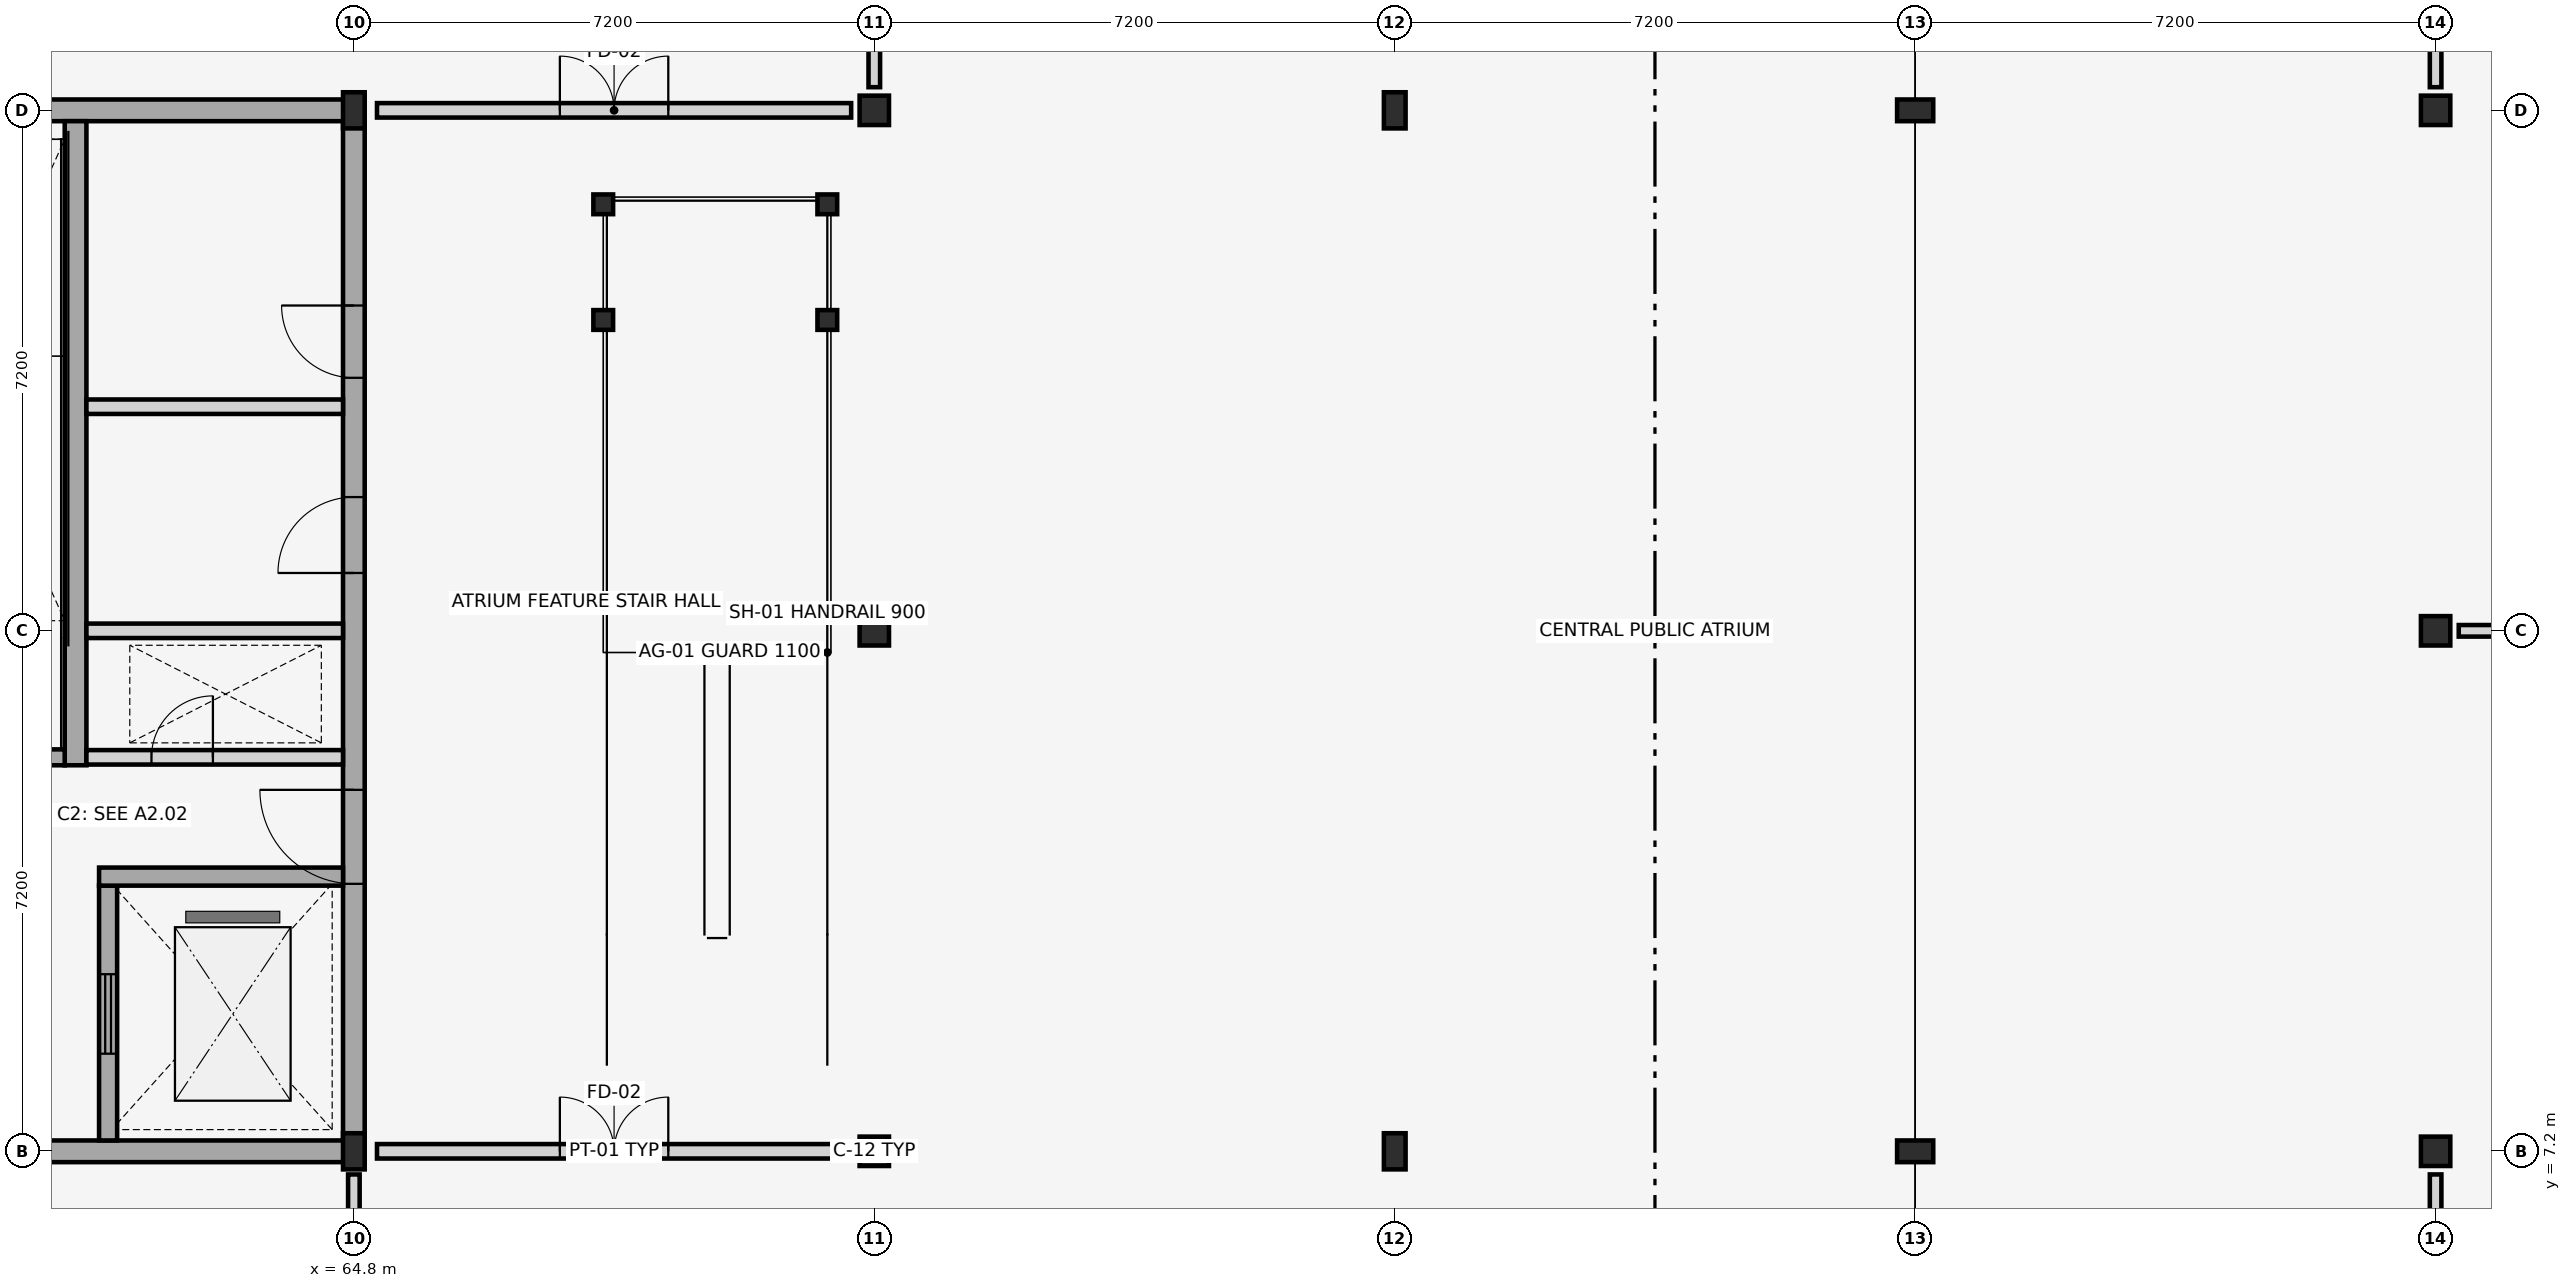
"""IFC4 building model, lengths in metres.
Left out: names, types, materials, properties, quantities, classifications, styles, units other than length and angle.
Written with IfcOpenShell. Run it as: python <this file> out.ifc"""

import sys

from ifc_helpers import new_model, si_unit, direction, frame, frame_2d, origin, origin_2d, place, context, subcontext, project, spatial, rectangle, hollow_circle, i_section, extrude, element, fill, save


model = new_model("IFC4")
c1 = context("Model", 3, precision=1e-05, world=origin(), true_north=direction((0.0, 1.0)))
c2 = subcontext(c1, "Body", "Model", "MODEL_VIEW")
j1 = project(units=[si_unit("LENGTHUNIT", "METRE"), si_unit("PLANEANGLEUNIT", "RADIAN")], contexts=[c1])
p1 = place(None, origin())
s1 = spatial("IfcSite", under=j1, at=p1, CompositionType="ELEMENT")
p2 = place(p1, origin())
s2 = spatial("IfcBuilding", under=s1, at=p2, CompositionType="ELEMENT")
p3 = place(p2, origin())
s3 = spatial("IfcBuildingStorey", under=s2, at=p3, CompositionType="ELEMENT", Elevation=0.0)
for number, where, z_axis, x_axis in (
    (1, (64.8, 7.2, 0.0), (0.0, 0.0, 1.0), (1.0, 0.0, 0.0)),
    (2, (64.8, 21.6, 0.0), (0.0, 0.0, 1.0), (1.0, 0.0, 0.0)),
):
    element("IfcColumn", number, at=place(p3, frame(where, z_axis=z_axis, x_axis=x_axis)), inside=s3, PredefinedType="COLUMN", context=c2, shape_type="SweptSolid", body=[
        extrude(i_section(OverallWidth=0.3, OverallDepth=0.5, WebThickness=0.014, FlangeThickness=0.028, FilletRadius=0.027, at=origin_2d()), origin(), (0.0, 0.0, 1.0), 4.5),
    ])
for number, where, z_axis, x_axis in (
    (3, (72.0, 7.2, 0.0), (0.0, 0.0, 1.0), (0.0, 1.0, 0.0)),
    (4, (72.0, 14.4, 0.0), (0.0, 0.0, 1.0), (1.0, 0.0, 0.0)),
    (5, (72.0, 21.6, 0.0), (0.0, 0.0, 1.0), (0.0, 1.0, 0.0)),
):
    element("IfcColumn", number, at=place(p3, frame(where, z_axis=z_axis, x_axis=x_axis)), inside=s3, PredefinedType="COLUMN", context=c2, shape_type="SweptSolid", body=[
        extrude(hollow_circle(Radius=0.203, WallThickness=0.016, at=origin_2d()), origin(), (0.0, 0.0, 1.0), 4.5),
    ])
for number, where, z_axis, x_axis in (
    (6, (79.2, 7.2, 0.0), (0.0, 0.0, 1.0), (1.0, 0.0, 0.0)),
    (7, (79.2, 21.6, 0.0), (0.0, 0.0, 1.0), (1.0, 0.0, 0.0)),
    (8, (86.4, 7.2, 0.0), (0.0, 0.0, 1.0), (0.0, 1.0, 0.0)),
    (9, (86.4, 21.6, 0.0), (0.0, 0.0, 1.0), (0.0, 1.0, 0.0)),
):
    element("IfcColumn", number, at=place(p3, frame(where, z_axis=z_axis, x_axis=x_axis)), inside=s3, PredefinedType="COLUMN", context=c2, shape_type="SweptSolid", body=[
        extrude(i_section(OverallWidth=0.3, OverallDepth=0.5, WebThickness=0.014, FlangeThickness=0.028, FilletRadius=0.027, at=origin_2d()), origin(), (0.0, 0.0, 1.0), 4.5),
    ])
for number, where, z_axis, x_axis in (
    (10, (93.6, 7.2, 0.0), (0.0, 0.0, 1.0), (1.0, 0.0, 0.0)),
    (11, (93.6, 14.4, 0.0), (0.0, 0.0, 1.0), (0.0, 1.0, 0.0)),
    (12, (93.6, 21.6, 0.0), (0.0, 0.0, 1.0), (1.0, 0.0, 0.0)),
):
    element("IfcColumn", number, at=place(p3, frame(where, z_axis=z_axis, x_axis=x_axis)), inside=s3, PredefinedType="COLUMN", context=c2, shape_type="SweptSolid", body=[
        extrude(hollow_circle(Radius=0.203, WallThickness=0.016, at=origin_2d()), origin(), (0.0, 0.0, 1.0), 4.5),
    ])
for number, where, z_axis, x_axis in (
    (13, (57.6, 7.2, 0.0), (0.0, 0.0, 1.0), (1.0, 0.0, 0.0)),
    (14, (57.6, 21.6, 0.0), (0.0, 0.0, 1.0), (1.0, 0.0, 0.0)),
):
    element("IfcWall", number, at=place(p3, frame(where, z_axis=z_axis, x_axis=x_axis)), inside=s3, PredefinedType="SHEAR", context=c2, shape_type="SweptSolid", body=[
        extrude(rectangle(XDim=7.35, YDim=0.3, at=frame_2d((3.675, 0.0))), origin(), (0.0, 0.0, 1.0), 4.28),
    ])
p4 = place(p3, frame((64.8, 7.35, 0.0), z_axis=(0.0, 0.0, 1.0), x_axis=(0.0, 1.0, 0.0)))
e15 = element("IfcWall", 15, at=p4, inside=s3, PredefinedType="SHEAR", context=c2, shape_type="SweptSolid", body=[
    extrude(rectangle(XDim=14.1, YDim=0.3, at=frame_2d((7.05, 0.0))), origin(), (0.0, 0.0, 1.0), 4.28),
])
p5 = place(p4, frame((3.55, 0.0, 0.0)))
e16 = element("IfcOpeningElement", 16, at=p5, cuts=e15, PredefinedType="OPENING", context=c2, shape_type="SweptSolid", body=[
    extrude(rectangle(XDim=1.3, YDim=2.2, at=frame_2d((0.65, 1.1))), frame((0.0, 0.16, 0.0), z_axis=(0.0, -1.0, 0.0), x_axis=(1.0, 0.0, 0.0)), (0.0, 0.0, 1.0), 0.32),
])
p6 = place(p4, frame((7.85, 0.0, 0.0)))
e17 = element("IfcOpeningElement", 17, at=p6, cuts=e15, PredefinedType="OPENING", context=c2, shape_type="SweptSolid", body=[
    extrude(rectangle(XDim=1.05, YDim=2.15, at=frame_2d((0.525, 1.075))), frame((0.0, 0.16, 0.0), z_axis=(0.0, -1.0, 0.0), x_axis=(1.0, 0.0, 0.0)), (0.0, 0.0, 1.0), 0.32),
])
p7 = place(p4, frame((10.55, 0.0, 0.0)))
e18 = element("IfcOpeningElement", 18, at=p7, cuts=e15, PredefinedType="OPENING", context=c2, shape_type="SweptSolid", body=[
    extrude(rectangle(XDim=1.0, YDim=2.15, at=frame_2d((0.5, 1.075))), frame((0.0, 0.16, 0.0), z_axis=(0.0, -1.0, 0.0), x_axis=(1.0, 0.0, 0.0)), (0.0, 0.0, 1.0), 0.32),
])
p8 = place(p3, frame((61.4, 7.35, 0.0), z_axis=(0.0, 0.0, 1.0), x_axis=(0.0, 1.0, 0.0)))
e19 = element("IfcWall", 19, at=p8, inside=s3, PredefinedType="SHEAR", context=c2, shape_type="SweptSolid", body=[
    extrude(rectangle(XDim=3.525, YDim=0.25, at=frame_2d((1.762, 0.0))), origin(), (0.0, 0.0, 1.0), 4.28),
])
p9 = place(p8, frame((1.2, 0.0, 0.0)))
e20 = element("IfcOpeningElement", 20, at=p9, cuts=e19, PredefinedType="OPENING", context=c2, shape_type="SweptSolid", body=[
    extrude(rectangle(XDim=1.1, YDim=2.15, at=frame_2d((0.55, 1.075))), frame((0.0, 0.135, 0.0), z_axis=(0.0, -1.0, 0.0), x_axis=(1.0, 0.0, 0.0)), (0.0, 0.0, 1.0), 0.27),
])
p10 = place(p3, frame((60.95, 12.54, 0.0), z_axis=(0.0, 0.0, 1.0), x_axis=(0.0, 1.0, 0.0)))
e21 = element("IfcWall", 21, at=p10, inside=s3, PredefinedType="SHEAR", context=c2, shape_type="SweptSolid", body=[
    extrude(rectangle(XDim=8.91, YDim=0.3, at=frame_2d((4.455, 0.0))), origin(), (0.0, 0.0, 1.0), 4.28),
])
p11 = place(p3, frame((61.1, 12.65, 0.0), z_axis=(0.0, 0.0, 1.0), x_axis=(1.0, 0.0, 0.0)))
e22 = element("IfcWall", 22, at=p11, inside=s3, PredefinedType="PLUMBINGWALL", context=c2, shape_type="SweptSolid", body=[
    extrude(rectangle(XDim=3.55, YDim=0.2, at=frame_2d((1.775, 0.0))), origin(), (0.0, 0.0, 1.0), 3.7),
])
p12 = place(p11, frame((0.9, 0.0, 0.0)))
e23 = element("IfcOpeningElement", 23, at=p12, cuts=e22, PredefinedType="OPENING", context=c2, shape_type="SweptSolid", body=[
    extrude(rectangle(XDim=0.85, YDim=2.05, at=frame_2d((0.425, 1.025))), frame((0.0, 0.11, 0.0), z_axis=(0.0, -1.0, 0.0), x_axis=(1.0, 0.0, 0.0)), (0.0, 0.0, 1.0), 0.22),
])
p13 = place(p3, frame((57.9, 12.65, 0.0), z_axis=(0.0, 0.0, 1.0), x_axis=(1.0, 0.0, 0.0)))
e24 = element("IfcWall", 24, at=p13, inside=s3, PredefinedType="SHEAR", context=c2, shape_type="SweptSolid", body=[
    extrude(rectangle(XDim=2.9, YDim=0.22, at=frame_2d((1.45, 0.0))), origin(), (0.0, 0.0, 1.0), 4.28),
])
p14 = place(p13, frame((0.75, 0.0, 0.0)))
e25 = element("IfcOpeningElement", 25, at=p14, cuts=e24, PredefinedType="OPENING", context=c2, shape_type="SweptSolid", body=[
    extrude(rectangle(XDim=1.3, YDim=2.2, at=frame_2d((0.65, 1.1))), frame((0.0, 0.12, 0.0), z_axis=(0.0, -1.0, 0.0), x_axis=(1.0, 0.0, 0.0)), (0.0, 0.0, 1.0), 0.24),
])
p15 = place(p3, frame((61.275, 11.0, 0.0), z_axis=(0.0, 0.0, 1.0), x_axis=(1.0, 0.0, 0.0)))
e26 = element("IfcWall", 26, at=p15, inside=s3, PredefinedType="SHEAR", context=c2, shape_type="SweptSolid", body=[
    extrude(rectangle(XDim=3.375, YDim=0.25, at=frame_2d((1.688, 0.0))), origin(), (0.0, 0.0, 1.0), 4.28),
])
for number, where, z_axis, x_axis in (
    (27, (61.1, 14.4, 0.0), (0.0, 0.0, 1.0), (1.0, 0.0, 0.0)),
    (28, (61.1, 17.5, 0.0), (0.0, 0.0, 1.0), (1.0, 0.0, 0.0)),
):
    element("IfcWall", number, at=place(p3, frame(where, z_axis=z_axis, x_axis=x_axis)), inside=s3, PredefinedType="PLUMBINGWALL", context=c2, shape_type="SweptSolid", body=[
        extrude(rectangle(XDim=3.55, YDim=0.2, at=frame_2d((1.775, 0.0))), origin(), (0.0, 0.0, 1.0), 3.7),
    ])
for number, where, z_axis, x_axis in (
    (29, (68.25, 18.7, 0.0), (0.0, 0.0, 1.0), (1.0, 0.0, 0.0)),
    (30, (71.35, 18.7, 0.0), (0.0, 0.0, 1.0), (1.0, 0.0, 0.0)),
    (31, (68.25, 20.3, 0.0), (0.0, 0.0, 1.0), (1.0, 0.0, 0.0)),
    (32, (71.35, 20.3, 0.0), (0.0, 0.0, 1.0), (1.0, 0.0, 0.0)),
):
    element("IfcColumn", number, at=place(p3, frame(where, z_axis=z_axis, x_axis=x_axis)), inside=s3, PredefinedType="COLUMN", context=c2, shape_type="SweptSolid", body=[
        extrude(hollow_circle(Radius=0.136, WallThickness=0.012, at=origin_2d()), origin(), (0.0, 0.0, 1.0), 4.5),
    ])
p16 = place(p3, frame((64.8, 0.32, 0.0), z_axis=(0.0, 0.0, 1.0), x_axis=(0.0, 1.0, 0.0)))
e33 = element("IfcWall", 33, at=p16, inside=s3, PredefinedType="PARTITIONING", context=c2, shape_type="SweptSolid", body=[
    extrude(rectangle(XDim=6.56, YDim=0.16, at=frame_2d((3.28, 0.0))), origin(), (0.0, 0.0, 1.0), 3.45),
])
p17 = place(p16, frame((2.155, 0.0, 0.0)))
e34 = element("IfcOpeningElement", 34, at=p17, cuts=e33, PredefinedType="OPENING", context=c2, shape_type="SweptSolid", body=[
    extrude(rectangle(XDim=2.25, YDim=2.7, at=frame_2d((1.125, 1.35))), frame((0.0, 0.09, 0.0), z_axis=(0.0, -1.0, 0.0), x_axis=(1.0, 0.0, 0.0)), (0.0, 0.0, 1.0), 0.18),
])
p18 = place(p3, frame((93.6, 0.32, 0.0), z_axis=(0.0, 0.0, 1.0), x_axis=(0.0, 1.0, 0.0)))
e35 = element("IfcWall", 35, at=p18, inside=s3, PredefinedType="PARTITIONING", context=c2, shape_type="SweptSolid", body=[
    extrude(rectangle(XDim=6.56, YDim=0.16, at=frame_2d((3.28, 0.0))), origin(), (0.0, 0.0, 1.0), 3.45),
])
p19 = place(p18, frame((2.53, 0.0, 0.0)))
e36 = element("IfcOpeningElement", 36, at=p19, cuts=e35, PredefinedType="OPENING", context=c2, shape_type="SweptSolid", body=[
    extrude(rectangle(XDim=1.5, YDim=2.25, at=frame_2d((0.75, 1.125))), frame((0.0, 0.09, 0.0), z_axis=(0.0, -1.0, 0.0), x_axis=(1.0, 0.0, 0.0)), (0.0, 0.0, 1.0), 0.18),
])
p20 = place(p3, frame((65.12, 7.2, 0.0), z_axis=(0.0, 0.0, 1.0), x_axis=(1.0, 0.0, 0.0)))
e37 = element("IfcWall", 37, at=p20, inside=s3, PredefinedType="PARTITIONING", context=c2, shape_type="SweptSolid", body=[
    extrude(rectangle(XDim=6.56, YDim=0.2, at=frame_2d((3.28, 0.0))), origin(), (0.0, 0.0, 1.0), 3.45),
])
p21 = place(p20, frame((2.53, 0.0, 0.0)))
e38 = element("IfcOpeningElement", 38, at=p21, cuts=e37, PredefinedType="OPENING", context=c2, shape_type="SweptSolid", body=[
    extrude(rectangle(XDim=1.5, YDim=2.25, at=frame_2d((0.75, 1.125))), frame((0.0, 0.11, 0.0), z_axis=(0.0, -1.0, 0.0), x_axis=(1.0, 0.0, 0.0)), (0.0, 0.0, 1.0), 0.22),
])
p22 = place(p3, frame((93.92, 14.4, 0.0), z_axis=(0.0, 0.0, 1.0), x_axis=(1.0, 0.0, 0.0)))
e39 = element("IfcWall", 39, at=p22, inside=s3, PredefinedType="PARTITIONING", context=c2, shape_type="SweptSolid", body=[
    extrude(rectangle(XDim=6.56, YDim=0.16, at=frame_2d((3.28, 0.0))), origin(), (0.0, 0.0, 1.0), 3.45),
])
p23 = place(p22, frame((2.68, 0.0, 0.0)))
e40 = element("IfcOpeningElement", 40, at=p23, cuts=e39, PredefinedType="OPENING", context=c2, shape_type="SweptSolid", body=[
    extrude(rectangle(XDim=1.2, YDim=2.25, at=frame_2d((0.6, 1.125))), frame((0.0, 0.09, 0.0), z_axis=(0.0, -1.0, 0.0), x_axis=(1.0, 0.0, 0.0)), (0.0, 0.0, 1.0), 0.18),
])
p24 = place(p3, frame((93.6, 21.92, 0.0), z_axis=(0.0, 0.0, 1.0), x_axis=(0.0, 1.0, 0.0)))
e41 = element("IfcWall", 41, at=p24, inside=s3, PredefinedType="PARTITIONING", context=c2, shape_type="SweptSolid", body=[
    extrude(rectangle(XDim=6.56, YDim=0.16, at=frame_2d((3.28, 0.0))), origin(), (0.0, 0.0, 1.0), 3.45),
])
p25 = place(p24, frame((2.33, 0.0, 0.0)))
e42 = element("IfcOpeningElement", 42, at=p25, cuts=e41, PredefinedType="OPENING", context=c2, shape_type="SweptSolid", body=[
    extrude(rectangle(XDim=1.9, YDim=2.45, at=frame_2d((0.95, 1.225))), frame((0.0, 0.09, 0.0), z_axis=(0.0, -1.0, 0.0), x_axis=(1.0, 0.0, 0.0)), (0.0, 0.0, 1.0), 0.18),
])
p26 = place(p3, frame((72.0, 21.92, 0.0), z_axis=(0.0, 0.0, 1.0), x_axis=(0.0, 1.0, 0.0)))
e43 = element("IfcWall", 43, at=p26, inside=s3, PredefinedType="PARTITIONING", context=c2, shape_type="SweptSolid", body=[
    extrude(rectangle(XDim=6.56, YDim=0.16, at=frame_2d((3.28, 0.0))), origin(), (0.0, 0.0, 1.0), 3.45),
])
p27 = place(p26, frame((2.58, 0.0, 0.0)))
e44 = element("IfcOpeningElement", 44, at=p27, cuts=e43, PredefinedType="OPENING", context=c2, shape_type="SweptSolid", body=[
    extrude(rectangle(XDim=1.4, YDim=2.3, at=frame_2d((0.7, 1.15))), frame((0.0, 0.09, 0.0), z_axis=(0.0, -1.0, 0.0), x_axis=(1.0, 0.0, 0.0)), (0.0, 0.0, 1.0), 0.18),
])
p28 = place(p3, frame((65.12, 21.6, 0.0), z_axis=(0.0, 0.0, 1.0), x_axis=(1.0, 0.0, 0.0)))
e45 = element("IfcWall", 45, at=p28, inside=s3, PredefinedType="PARTITIONING", context=c2, shape_type="SweptSolid", body=[
    extrude(rectangle(XDim=6.56, YDim=0.2, at=frame_2d((3.28, 0.0))), origin(), (0.0, 0.0, 1.0), 3.45),
])
p29 = place(p28, frame((2.53, 0.0, 0.0)))
e46 = element("IfcOpeningElement", 46, at=p29, cuts=e45, PredefinedType="OPENING", context=c2, shape_type="SweptSolid", body=[
    extrude(rectangle(XDim=1.5, YDim=2.25, at=frame_2d((0.75, 1.125))), frame((0.0, 0.11, 0.0), z_axis=(0.0, -1.0, 0.0), x_axis=(1.0, 0.0, 0.0)), (0.0, 0.0, 1.0), 0.22),
])
p30 = place(p5, origin())
e47 = element("IfcDoor", 47, at=p30, inside=s3, OperationType="SINGLE_SWING_RIGHT", PredefinedType="DOOR", context=c2, shape_type="SweptSolid", body=[
    extrude(rectangle(XDim=1.3, YDim=2.2, at=frame_2d((0.65, 1.1))), frame((0.0, 0.025, 0.0), z_axis=(0.0, -1.0, 0.0), x_axis=(1.0, 0.0, 0.0)), (0.0, 0.0, 1.0), 0.05),
])
fill(e16, e47)
p31 = place(p6, origin())
e48 = element("IfcDoor", 48, at=p31, inside=s3, OperationType="SINGLE_SWING_LEFT", PredefinedType="DOOR", context=c2, shape_type="SweptSolid", body=[
    extrude(rectangle(XDim=1.05, YDim=2.15, at=frame_2d((0.525, 1.075))), frame((0.0, 0.025, 0.0), z_axis=(0.0, -1.0, 0.0), x_axis=(1.0, 0.0, 0.0)), (0.0, 0.0, 1.0), 0.05),
])
fill(e17, e48)
p32 = place(p7, origin())
e49 = element("IfcDoor", 49, at=p32, inside=s3, OperationType="SINGLE_SWING_RIGHT", PredefinedType="DOOR", context=c2, shape_type="SweptSolid", body=[
    extrude(rectangle(XDim=1.0, YDim=2.15, at=frame_2d((0.5, 1.075))), frame((0.0, 0.025, 0.0), z_axis=(0.0, -1.0, 0.0), x_axis=(1.0, 0.0, 0.0)), (0.0, 0.0, 1.0), 0.05),
])
fill(e18, e49)
p33 = place(p9, origin())
e50 = element("IfcDoor", 50, at=p33, inside=s3, OperationType="SLIDING_TO_LEFT", PredefinedType="DOOR", context=c2, shape_type="SweptSolid", body=[
    extrude(rectangle(XDim=1.1, YDim=2.15, at=frame_2d((0.55, 1.075))), frame((0.0, 0.025, 0.0), z_axis=(0.0, -1.0, 0.0), x_axis=(1.0, 0.0, 0.0)), (0.0, 0.0, 1.0), 0.05),
])
fill(e20, e50)
p34 = place(p12, origin())
e51 = element("IfcDoor", 51, at=p34, inside=s3, OperationType="SINGLE_SWING_RIGHT", PredefinedType="TRAPDOOR", context=c2, shape_type="SweptSolid", body=[
    extrude(rectangle(XDim=0.85, YDim=2.05, at=frame_2d((0.425, 1.025))), frame((0.0, 0.025, 0.0), z_axis=(0.0, -1.0, 0.0), x_axis=(1.0, 0.0, 0.0)), (0.0, 0.0, 1.0), 0.05),
])
fill(e23, e51)
p35 = place(p21, origin())
e52 = element("IfcDoor", 52, at=p35, inside=s3, OperationType="DOUBLE_DOOR_SINGLE_SWING", PredefinedType="DOOR", context=c2, shape_type="SweptSolid", body=[
    extrude(rectangle(XDim=1.5, YDim=2.25, at=frame_2d((0.75, 1.125))), frame((0.0, 0.025, 0.0), z_axis=(0.0, -1.0, 0.0), x_axis=(1.0, 0.0, 0.0)), (0.0, 0.0, 1.0), 0.05),
])
fill(e38, e52)
p36 = place(p29, origin())
e53 = element("IfcDoor", 53, at=p36, inside=s3, OperationType="DOUBLE_DOOR_SINGLE_SWING", PredefinedType="DOOR", context=c2, shape_type="SweptSolid", body=[
    extrude(rectangle(XDim=1.5, YDim=2.25, at=frame_2d((0.75, 1.125))), frame((0.0, 0.025, 0.0), z_axis=(0.0, -1.0, 0.0), x_axis=(1.0, 0.0, 0.0)), (0.0, 0.0, 1.0), 0.05),
])
fill(e46, e53)
save(model, sys.argv[1])
